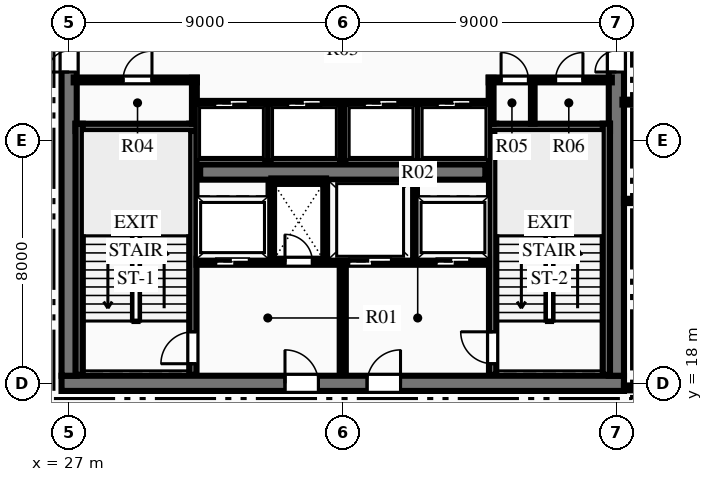
"""IFC4 building model, lengths in metres.
Left out: names, types, materials, properties, quantities, classifications, styles, units other than length and angle.
Written with IfcOpenShell. Run it as: python <this file> out.ifc"""

import sys

from ifc_helpers import new_model, si_unit, direction, frame, frame_2d, origin, place, context, subcontext, project, spatial, rectangle, extrude, element, fill, save


model = new_model("IFC4")
c1 = context("Model", 3, precision=1e-05, world=origin(), true_north=direction((0.0, 1.0)))
c2 = subcontext(c1, "Body", "Model", "MODEL_VIEW")
j1 = project(units=[si_unit("LENGTHUNIT", "METRE"), si_unit("PLANEANGLEUNIT", "RADIAN")], contexts=[c1])
p1 = place(None, origin())
s1 = spatial("IfcSite", under=j1, at=p1, CompositionType="ELEMENT")
p2 = place(p1, origin())
s2 = spatial("IfcBuilding", under=s1, at=p2, CompositionType="ELEMENT")
p3 = place(p2, frame((0.0, 0.0, 220.95)))
s3 = spatial("IfcBuildingStorey", under=s2, at=p3, CompositionType="ELEMENT", Elevation=220.95)
p4 = place(p3, frame((26.75, 18.0, 0.0), z_axis=(0.0, 0.0, 1.0), x_axis=(1.0, 0.0, 0.0)))
e1 = element("IfcWall", 1, at=p4, inside=s3, PredefinedType="SHEAR", context=c2, shape_type="SweptSolid", body=[
    extrude(rectangle(XDim=18.5, YDim=0.5, at=frame_2d((9.25, 0.0))), origin(), (0.0, 0.0, 1.0), 3.75),
])
p5 = place(p4, frame((7.35, 0.0, 0.0)))
e2 = element("IfcOpeningElement", 2, at=p5, cuts=e1, PredefinedType="OPENING", context=c2, shape_type="SweptSolid", body=[
    extrude(rectangle(XDim=1.1, YDim=2.15, at=frame_2d((0.55, 1.075))), frame((0.0, 0.26, 0.0), z_axis=(0.0, -1.0, 0.0), x_axis=(1.0, 0.0, 0.0)), (0.0, 0.0, 1.0), 0.52),
])
p6 = place(p4, frame((10.05, 0.0, 0.0)))
e3 = element("IfcOpeningElement", 3, at=p6, cuts=e1, PredefinedType="OPENING", context=c2, shape_type="SweptSolid", body=[
    extrude(rectangle(XDim=1.1, YDim=2.15, at=frame_2d((0.55, 1.075))), frame((0.0, 0.26, 0.0), z_axis=(0.0, -1.0, 0.0), x_axis=(1.0, 0.0, 0.0)), (0.0, 0.0, 1.0), 0.52),
])
p7 = place(p3, frame((27.0, 18.25, 0.0), z_axis=(0.0, 0.0, 1.0), x_axis=(0.0, 1.0, 0.0)))
e4 = element("IfcWall", 4, at=p7, inside=s3, PredefinedType="SHEAR", context=c2, shape_type="SweptSolid", body=[
    extrude(rectangle(XDim=15.5, YDim=0.5, at=frame_2d((7.75, 0.0))), origin(), (0.0, 0.0, 1.0), 3.75),
])
p8 = place(p7, frame((9.99, 0.0, 0.0)))
e5 = element("IfcOpeningElement", 5, at=p8, cuts=e4, PredefinedType="OPENING", context=c2, shape_type="SweptSolid", body=[
    extrude(rectangle(XDim=1.4, YDim=2.2, at=frame_2d((0.7, 1.1))), frame((0.0, 0.26, 0.0), z_axis=(0.0, -1.0, 0.0), x_axis=(1.0, 0.0, 0.0)), (0.0, 0.0, 1.0), 0.52),
])
p9 = place(p3, frame((45.0, 18.25, 0.0), z_axis=(0.0, 0.0, 1.0), x_axis=(0.0, 1.0, 0.0)))
e6 = element("IfcWall", 6, at=p9, inside=s3, PredefinedType="SHEAR", context=c2, shape_type="SweptSolid", body=[
    extrude(rectangle(XDim=15.5, YDim=0.5, at=frame_2d((7.75, 0.0))), origin(), (0.0, 0.0, 1.0), 3.75),
])
p10 = place(p9, frame((9.99, 0.0, 0.0)))
e7 = element("IfcOpeningElement", 7, at=p10, cuts=e6, PredefinedType="OPENING", context=c2, shape_type="SweptSolid", body=[
    extrude(rectangle(XDim=1.4, YDim=2.2, at=frame_2d((0.7, 1.1))), frame((0.0, 0.26, 0.0), z_axis=(0.0, -1.0, 0.0), x_axis=(1.0, 0.0, 0.0)), (0.0, 0.0, 1.0), 0.52),
])
p11 = place(p3, frame((31.31, 24.95, 0.0), z_axis=(0.0, 0.0, 1.0), x_axis=(1.0, 0.0, 0.0)))
e8 = element("IfcWall", 8, at=p11, inside=s3, PredefinedType="SHEAR", context=c2, shape_type="SweptSolid", body=[
    extrude(rectangle(XDim=9.38, YDim=0.5, at=frame_2d((4.69, 0.0))), origin(), (0.0, 0.0, 1.0), 3.75),
])
p12 = place(p3, frame((31.07, 18.28, 0.0), z_axis=(0.0, 0.0, 1.0), x_axis=(0.0, 1.0, 0.0)))
e9 = element("IfcWall", 9, at=p12, inside=s3, PredefinedType="SHEAR", context=c2, shape_type="SweptSolid", body=[
    extrude(rectangle(XDim=8.26, YDim=0.24, at=frame_2d((4.13, 0.0))), origin(), (0.0, 0.0, 1.0), 3.75),
])
p13 = place(p12, frame((0.365, 0.0, 0.0)))
e10 = element("IfcOpeningElement", 10, at=p13, cuts=e9, PredefinedType="OPENING", context=c2, shape_type="SweptSolid", body=[
    extrude(rectangle(XDim=1.05, YDim=2.15, at=frame_2d((0.525, 1.075))), frame((0.0, 0.13, 0.0), z_axis=(0.0, -1.0, 0.0), x_axis=(1.0, 0.0, 0.0)), (0.0, 0.0, 1.0), 0.26),
])
p14 = place(p3, frame((27.21, 26.42, 0.0), z_axis=(0.0, 0.0, 1.0), x_axis=(1.0, 0.0, 0.0)))
e11 = element("IfcWall", 11, at=p14, inside=s3, PredefinedType="SHEAR", context=c2, shape_type="SweptSolid", body=[
    extrude(rectangle(XDim=3.98, YDim=0.24, at=frame_2d((1.99, 0.0))), origin(), (0.0, 0.0, 1.0), 3.75),
])
p15 = place(p3, frame((27.33, 18.28, 0.0), z_axis=(0.0, 0.0, 1.0), x_axis=(0.0, 1.0, 0.0)))
e12 = element("IfcWall", 12, at=p15, inside=s3, PredefinedType="SHEAR", context=c2, shape_type="SweptSolid", body=[
    extrude(rectangle(XDim=8.26, YDim=0.24, at=frame_2d((4.13, 0.0))), origin(), (0.0, 0.0, 1.0), 3.75),
])
p16 = place(p3, frame((40.93, 18.28, 0.0), z_axis=(0.0, 0.0, 1.0), x_axis=(0.0, 1.0, 0.0)))
e13 = element("IfcWall", 13, at=p16, inside=s3, PredefinedType="SHEAR", context=c2, shape_type="SweptSolid", body=[
    extrude(rectangle(XDim=8.26, YDim=0.24, at=frame_2d((4.13, 0.0))), origin(), (0.0, 0.0, 1.0), 3.75),
])
p17 = place(p16, frame((0.365, 0.0, 0.0)))
e14 = element("IfcOpeningElement", 14, at=p17, cuts=e13, PredefinedType="OPENING", context=c2, shape_type="SweptSolid", body=[
    extrude(rectangle(XDim=1.05, YDim=2.15, at=frame_2d((0.525, 1.075))), frame((0.0, 0.13, 0.0), z_axis=(0.0, -1.0, 0.0), x_axis=(1.0, 0.0, 0.0)), (0.0, 0.0, 1.0), 0.26),
])
p18 = place(p3, frame((40.81, 26.42, 0.0), z_axis=(0.0, 0.0, 1.0), x_axis=(1.0, 0.0, 0.0)))
e15 = element("IfcWall", 15, at=p18, inside=s3, PredefinedType="SHEAR", context=c2, shape_type="SweptSolid", body=[
    extrude(rectangle(XDim=3.98, YDim=0.24, at=frame_2d((1.99, 0.0))), origin(), (0.0, 0.0, 1.0), 3.75),
])
p19 = place(p3, frame((44.67, 18.28, 0.0), z_axis=(0.0, 0.0, 1.0), x_axis=(0.0, 1.0, 0.0)))
e16 = element("IfcWall", 16, at=p19, inside=s3, PredefinedType="SHEAR", context=c2, shape_type="SweptSolid", body=[
    extrude(rectangle(XDim=8.26, YDim=0.24, at=frame_2d((4.13, 0.0))), origin(), (0.0, 0.0, 1.0), 3.75),
])
p20 = place(p3, frame((36.0, 18.28, 0.0), z_axis=(0.0, 0.0, 1.0), x_axis=(0.0, 1.0, 0.0)))
e17 = element("IfcWall", 17, at=p20, inside=s3, PredefinedType="PARTITIONING", context=c2, shape_type="SweptSolid", body=[
    extrude(rectangle(XDim=3.77, YDim=0.2, at=frame_2d((1.885, 0.0))), origin(), (0.0, 0.0, 1.0), 3.47),
])
p21 = place(p3, frame((31.19, 22.0, 0.0), z_axis=(0.0, 0.0, 1.0), x_axis=(1.0, 0.0, 0.0)))
e18 = element("IfcWall", 18, at=p21, inside=s3, PredefinedType="PARTITIONING", context=c2, shape_type="SweptSolid", body=[
    extrude(rectangle(XDim=4.69, YDim=0.2, at=frame_2d((2.345, 0.0))), origin(), (0.0, 0.0, 1.0), 3.47),
])
p22 = place(p21, frame((2.91, 0.0, 0.0)))
e19 = element("IfcOpeningElement", 19, at=p22, cuts=e18, PredefinedType="OPENING", context=c2, shape_type="SweptSolid", body=[
    extrude(rectangle(XDim=0.9, YDim=2.15, at=frame_2d((0.45, 1.075))), frame((0.0, 0.11, 0.0), z_axis=(0.0, -1.0, 0.0), x_axis=(1.0, 0.0, 0.0)), (0.0, 0.0, 1.0), 0.22),
])
p23 = place(p21, frame((0.635, 0.0, 0.0)))
e20 = element("IfcOpeningElement", 20, at=p23, cuts=e18, PredefinedType="OPENING", context=c2, shape_type="SweptSolid", body=[
    extrude(rectangle(XDim=1.1, YDim=2.15, at=frame_2d((0.55, 1.075))), frame((0.0, 0.11, 0.0), z_axis=(0.0, -1.0, 0.0), x_axis=(1.0, 0.0, 0.0)), (0.0, 0.0, 1.0), 0.22),
])
p24 = place(p3, frame((36.12, 22.0, 0.0), z_axis=(0.0, 0.0, 1.0), x_axis=(1.0, 0.0, 0.0)))
e21 = element("IfcWall", 21, at=p24, inside=s3, PredefinedType="PARTITIONING", context=c2, shape_type="SweptSolid", body=[
    extrude(rectangle(XDim=4.69, YDim=0.2, at=frame_2d((2.345, 0.0))), origin(), (0.0, 0.0, 1.0), 3.47),
])
p25 = place(p24, frame((2.955, 0.0, 0.0)))
e22 = element("IfcOpeningElement", 22, at=p25, cuts=e21, PredefinedType="OPENING", context=c2, shape_type="SweptSolid", body=[
    extrude(rectangle(XDim=1.1, YDim=2.15, at=frame_2d((0.55, 1.075))), frame((0.0, 0.11, 0.0), z_axis=(0.0, -1.0, 0.0), x_axis=(1.0, 0.0, 0.0)), (0.0, 0.0, 1.0), 0.22),
])
p26 = place(p24, frame((0.08, 0.0, 0.0)))
e23 = element("IfcOpeningElement", 23, at=p26, cuts=e21, PredefinedType="OPENING", context=c2, shape_type="SweptSolid", body=[
    extrude(rectangle(XDim=1.4, YDim=2.2, at=frame_2d((0.7, 1.1))), frame((0.0, 0.11, 0.0), z_axis=(0.0, -1.0, 0.0), x_axis=(1.0, 0.0, 0.0)), (0.0, 0.0, 1.0), 0.22),
])
for number, where, z_axis, x_axis in (
    (24, (33.65, 22.05, 0.0), (0.0, 0.0, 1.0), (0.0, 1.0, 0.0)),
    (25, (35.45, 22.05, 0.0), (0.0, 0.0, 1.0), (0.0, 1.0, 0.0)),
):
    element("IfcWall", number, at=place(p3, frame(where, z_axis=z_axis, x_axis=x_axis)), inside=s3, PredefinedType="PARTITIONING", context=c2, shape_type="SweptSolid", body=[
        extrude(rectangle(XDim=2.6, YDim=0.18, at=frame_2d((1.3, 0.0))), origin(), (0.0, 0.0, 1.0), 3.47),
    ])
p27 = place(p3, frame((33.65, 24.65, 0.0), z_axis=(0.0, 0.0, 1.0), x_axis=(1.0, 0.0, 0.0)))
e26 = element("IfcWall", 26, at=p27, inside=s3, PredefinedType="PARTITIONING", context=c2, shape_type="SweptSolid", body=[
    extrude(rectangle(XDim=1.8, YDim=0.18, at=frame_2d((0.9, 0.0))), origin(), (0.0, 0.0, 1.0), 3.47),
])
p28 = place(p3, frame((38.35, 22.05, 0.0), z_axis=(0.0, 0.0, 1.0), x_axis=(0.0, 1.0, 0.0)))
e27 = element("IfcWall", 27, at=p28, inside=s3, PredefinedType="PARTITIONING", context=c2, shape_type="SweptSolid", body=[
    extrude(rectangle(XDim=2.6, YDim=0.18, at=frame_2d((1.3, 0.0))), origin(), (0.0, 0.0, 1.0), 3.47),
])
p29 = place(p3, frame((27.15, 27.98, 0.0), z_axis=(0.0, 0.0, 1.0), x_axis=(1.0, 0.0, 0.0)))
e28 = element("IfcWall", 28, at=p29, inside=s3, PredefinedType="PARTITIONING", context=c2, shape_type="SweptSolid", body=[
    extrude(rectangle(XDim=4.05, YDim=0.16, at=frame_2d((2.025, 0.0))), origin(), (0.0, 0.0, 1.0), 3.47),
])
p30 = place(p29, frame((1.625, 0.0, 0.0)))
e29 = element("IfcOpeningElement", 29, at=p30, cuts=e28, PredefinedType="OPENING", context=c2, shape_type="SweptSolid", body=[
    extrude(rectangle(XDim=0.95, YDim=2.15, at=frame_2d((0.475, 1.075))), frame((0.0, 0.09, 0.0), z_axis=(0.0, -1.0, 0.0), x_axis=(1.0, 0.0, 0.0)), (0.0, 0.0, 1.0), 0.18),
])
p31 = place(p3, frame((31.12, 26.54, 0.0), z_axis=(0.0, 0.0, 1.0), x_axis=(0.0, 1.0, 0.0)))
e30 = element("IfcWall", 30, at=p31, inside=s3, PredefinedType="PARTITIONING", context=c2, shape_type="SweptSolid", body=[
    extrude(rectangle(XDim=1.51, YDim=0.16, at=frame_2d((0.755, 0.0))), origin(), (0.0, 0.0, 1.0), 3.47),
])
p32 = place(p3, frame((40.8, 27.98, 0.0), z_axis=(0.0, 0.0, 1.0), x_axis=(1.0, 0.0, 0.0)))
e31 = element("IfcWall", 31, at=p32, inside=s3, PredefinedType="PARTITIONING", context=c2, shape_type="SweptSolid", body=[
    extrude(rectangle(XDim=4.05, YDim=0.16, at=frame_2d((2.025, 0.0))), origin(), (0.0, 0.0, 1.0), 3.47),
])
p33 = place(p32, frame((0.407, 0.0, 0.0)))
e32 = element("IfcOpeningElement", 32, at=p33, cuts=e31, PredefinedType="OPENING", context=c2, shape_type="SweptSolid", body=[
    extrude(rectangle(XDim=0.9, YDim=2.15, at=frame_2d((0.45, 1.075))), frame((0.0, 0.09, 0.0), z_axis=(0.0, -1.0, 0.0), x_axis=(1.0, 0.0, 0.0)), (0.0, 0.0, 1.0), 0.18),
])
p34 = place(p32, frame((2.2, 0.0, 0.0)))
e33 = element("IfcOpeningElement", 33, at=p34, cuts=e31, PredefinedType="OPENING", context=c2, shape_type="SweptSolid", body=[
    extrude(rectangle(XDim=0.9, YDim=2.15, at=frame_2d((0.45, 1.075))), frame((0.0, 0.09, 0.0), z_axis=(0.0, -1.0, 0.0), x_axis=(1.0, 0.0, 0.0)), (0.0, 0.0, 1.0), 0.18),
])
p35 = place(p3, frame((40.88, 26.54, 0.0), z_axis=(0.0, 0.0, 1.0), x_axis=(0.0, 1.0, 0.0)))
e34 = element("IfcWall", 34, at=p35, inside=s3, PredefinedType="PARTITIONING", context=c2, shape_type="SweptSolid", body=[
    extrude(rectangle(XDim=1.51, YDim=0.16, at=frame_2d((0.755, 0.0))), origin(), (0.0, 0.0, 1.0), 3.47),
])
p36 = place(p3, frame((42.25, 26.54, 0.0), z_axis=(0.0, 0.0, 1.0), x_axis=(0.0, 1.0, 0.0)))
e35 = element("IfcWall", 35, at=p36, inside=s3, PredefinedType="PARTITIONING", context=c2, shape_type="SweptSolid", body=[
    extrude(rectangle(XDim=1.44, YDim=0.12, at=frame_2d((0.72, 0.0))), origin(), (0.0, 0.0, 1.0), 3.47),
])
p37 = place(p3, frame((31.2, 27.2, 0.0), z_axis=(0.0, 0.0, 1.0), x_axis=(1.0, 0.0, 0.0)))
e36 = element("IfcWall", 36, at=p37, inside=s3, PredefinedType="PARTITIONING", context=c2, shape_type="SweptSolid", body=[
    extrude(rectangle(XDim=9.6, YDim=0.18, at=frame_2d((4.8, 0.0))), origin(), (0.0, 0.0, 1.0), 3.47),
])
p38 = place(p37, frame((0.59, 0.0, 0.0)))
e37 = element("IfcOpeningElement", 37, at=p38, cuts=e36, PredefinedType="OPENING", context=c2, shape_type="SweptSolid", body=[
    extrude(rectangle(XDim=1.1, YDim=2.15, at=frame_2d((0.55, 1.075))), frame((0.0, 0.1, 0.0), z_axis=(0.0, -1.0, 0.0), x_axis=(1.0, 0.0, 0.0)), (0.0, 0.0, 1.0), 0.2),
])
p39 = place(p37, frame((2.99, 0.0, 0.0)))
e38 = element("IfcOpeningElement", 38, at=p39, cuts=e36, PredefinedType="OPENING", context=c2, shape_type="SweptSolid", body=[
    extrude(rectangle(XDim=1.1, YDim=2.15, at=frame_2d((0.55, 1.075))), frame((0.0, 0.1, 0.0), z_axis=(0.0, -1.0, 0.0), x_axis=(1.0, 0.0, 0.0)), (0.0, 0.0, 1.0), 0.2),
])
p40 = place(p37, frame((5.51, 0.0, 0.0)))
e39 = element("IfcOpeningElement", 39, at=p40, cuts=e36, PredefinedType="OPENING", context=c2, shape_type="SweptSolid", body=[
    extrude(rectangle(XDim=1.1, YDim=2.15, at=frame_2d((0.55, 1.075))), frame((0.0, 0.1, 0.0), z_axis=(0.0, -1.0, 0.0), x_axis=(1.0, 0.0, 0.0)), (0.0, 0.0, 1.0), 0.2),
])
p41 = place(p37, frame((7.91, 0.0, 0.0)))
e40 = element("IfcOpeningElement", 40, at=p41, cuts=e36, PredefinedType="OPENING", context=c2, shape_type="SweptSolid", body=[
    extrude(rectangle(XDim=1.1, YDim=2.15, at=frame_2d((0.55, 1.075))), frame((0.0, 0.1, 0.0), z_axis=(0.0, -1.0, 0.0), x_axis=(1.0, 0.0, 0.0)), (0.0, 0.0, 1.0), 0.2),
])
for number, where, z_axis, x_axis in (
    (41, (33.54, 25.3, 0.0), (0.0, 0.0, 1.0), (0.0, 1.0, 0.0)),
    (42, (36.0, 25.3, 0.0), (0.0, 0.0, 1.0), (0.0, 1.0, 0.0)),
    (43, (38.46, 25.3, 0.0), (0.0, 0.0, 1.0), (0.0, 1.0, 0.0)),
):
    element("IfcWall", number, at=place(p3, frame(where, z_axis=z_axis, x_axis=x_axis)), inside=s3, PredefinedType="PARTITIONING", context=c2, shape_type="SweptSolid", body=[
        extrude(rectangle(XDim=1.9, YDim=0.18, at=frame_2d((0.95, 0.0))), origin(), (0.0, 0.0, 1.0), 3.47),
    ])
p42 = place(p3, frame((45.25, 17.85, 0.0), z_axis=(0.0, 0.0, 1.0), x_axis=(1.0, 0.0, 0.0)))
e44 = element("IfcWall", 44, at=p42, inside=s3, PredefinedType="PARTITIONING", context=c2, shape_type="SweptSolid", body=[
    extrude(rectangle(XDim=8.55, YDim=0.16, at=frame_2d((4.275, 0.0))), origin(), (0.0, 0.0, 1.0), 3.47),
])
p43 = place(p42, frame((2.211, 0.0, 0.0)))
e45 = element("IfcOpeningElement", 45, at=p43, cuts=e44, PredefinedType="OPENING", context=c2, shape_type="SweptSolid", body=[
    extrude(rectangle(XDim=1.05, YDim=2.15, at=frame_2d((0.525, 1.075))), frame((0.0, 0.09, 0.0), z_axis=(0.0, -1.0, 0.0), x_axis=(1.0, 0.0, 0.0)), (0.0, 0.0, 1.0), 0.18),
])
p44 = place(p3, frame((45.2, 27.25, 0.0), z_axis=(0.0, 0.0, 1.0), x_axis=(1.0, 0.0, 0.0)))
e46 = element("IfcWall", 46, at=p44, inside=s3, PredefinedType="PARTITIONING", context=c2, shape_type="SweptSolid", body=[
    extrude(rectangle(XDim=2.25, YDim=0.16, at=frame_2d((1.125, 0.0))), origin(), (0.0, 0.0, 1.0), 3.47),
])
p45 = place(p3, frame((45.25, 24.0, 0.0), z_axis=(0.0, 0.0, 1.0), x_axis=(1.0, 0.0, 0.0)))
e47 = element("IfcWall", 47, at=p45, inside=s3, PredefinedType="PARTITIONING", context=c2, shape_type="SweptSolid", body=[
    extrude(rectangle(XDim=17.085, YDim=0.14, at=frame_2d((8.542, 0.0))), origin(), (0.0, 0.0, 1.0), 3.47),
])
p46 = place(p30, origin())
e48 = element("IfcDoor", 48, at=p46, inside=s3, OperationType="SINGLE_SWING_RIGHT", PredefinedType="DOOR", context=c2, shape_type="SweptSolid", body=[
    extrude(rectangle(XDim=0.95, YDim=2.15, at=frame_2d((0.475, 1.075))), frame((0.0, 0.025, 0.0), z_axis=(0.0, -1.0, 0.0), x_axis=(1.0, 0.0, 0.0)), (0.0, 0.0, 1.0), 0.05),
])
fill(e29, e48)
p47 = place(p33, origin())
e49 = element("IfcDoor", 49, at=p47, inside=s3, OperationType="SINGLE_SWING_LEFT", PredefinedType="DOOR", context=c2, shape_type="SweptSolid", body=[
    extrude(rectangle(XDim=0.9, YDim=2.15, at=frame_2d((0.45, 1.075))), frame((0.0, 0.025, 0.0), z_axis=(0.0, -1.0, 0.0), x_axis=(1.0, 0.0, 0.0)), (0.0, 0.0, 1.0), 0.05),
])
fill(e32, e49)
p48 = place(p34, origin())
e50 = element("IfcDoor", 50, at=p48, inside=s3, OperationType="SINGLE_SWING_RIGHT", PredefinedType="DOOR", context=c2, shape_type="SweptSolid", body=[
    extrude(rectangle(XDim=0.9, YDim=2.15, at=frame_2d((0.45, 1.075))), frame((0.0, 0.025, 0.0), z_axis=(0.0, -1.0, 0.0), x_axis=(1.0, 0.0, 0.0)), (0.0, 0.0, 1.0), 0.05),
])
fill(e33, e50)
p49 = place(p13, origin())
e51 = element("IfcDoor", 51, at=p49, inside=s3, OperationType="SINGLE_SWING_LEFT", PredefinedType="DOOR", context=c2, shape_type="SweptSolid", body=[
    extrude(rectangle(XDim=1.05, YDim=2.15, at=frame_2d((0.525, 1.075))), frame((0.0, 0.025, 0.0), z_axis=(0.0, -1.0, 0.0), x_axis=(1.0, 0.0, 0.0)), (0.0, 0.0, 1.0), 0.05),
])
fill(e10, e51)
p50 = place(p17, origin())
e52 = element("IfcDoor", 52, at=p50, inside=s3, OperationType="SINGLE_SWING_RIGHT", PredefinedType="DOOR", context=c2, shape_type="SweptSolid", body=[
    extrude(rectangle(XDim=1.05, YDim=2.15, at=frame_2d((0.525, 1.075))), frame((0.0, 0.025, 0.0), z_axis=(0.0, -1.0, 0.0), x_axis=(1.0, 0.0, 0.0)), (0.0, 0.0, 1.0), 0.05),
])
fill(e14, e52)
p51 = place(p5, origin())
e53 = element("IfcDoor", 53, at=p51, inside=s3, OperationType="SINGLE_SWING_LEFT", PredefinedType="DOOR", context=c2, shape_type="SweptSolid", body=[
    extrude(rectangle(XDim=1.1, YDim=2.15, at=frame_2d((0.55, 1.075))), frame((0.0, 0.025, 0.0), z_axis=(0.0, -1.0, 0.0), x_axis=(1.0, 0.0, 0.0)), (0.0, 0.0, 1.0), 0.05),
])
fill(e2, e53)
p52 = place(p6, origin())
e54 = element("IfcDoor", 54, at=p52, inside=s3, OperationType="SINGLE_SWING_RIGHT", PredefinedType="DOOR", context=c2, shape_type="SweptSolid", body=[
    extrude(rectangle(XDim=1.1, YDim=2.15, at=frame_2d((0.55, 1.075))), frame((0.0, 0.025, 0.0), z_axis=(0.0, -1.0, 0.0), x_axis=(1.0, 0.0, 0.0)), (0.0, 0.0, 1.0), 0.05),
])
fill(e3, e54)
p53 = place(p22, origin())
e55 = element("IfcDoor", 55, at=p53, inside=s3, OperationType="SINGLE_SWING_LEFT", PredefinedType="DOOR", context=c2, shape_type="SweptSolid", body=[
    extrude(rectangle(XDim=0.9, YDim=2.15, at=frame_2d((0.45, 1.075))), frame((0.0, 0.025, 0.0), z_axis=(0.0, -1.0, 0.0), x_axis=(1.0, 0.0, 0.0)), (0.0, 0.0, 1.0), 0.05),
])
fill(e19, e55)
p54 = place(p8, origin())
e56 = element("IfcDoor", 56, at=p54, inside=s3, OperationType="DOUBLE_DOOR_SINGLE_SWING", PredefinedType="DOOR", context=c2, shape_type="SweptSolid", body=[
    extrude(rectangle(XDim=1.4, YDim=2.2, at=frame_2d((0.7, 1.1))), frame((0.0, 0.025, 0.0), z_axis=(0.0, -1.0, 0.0), x_axis=(1.0, 0.0, 0.0)), (0.0, 0.0, 1.0), 0.05),
])
fill(e5, e56)
p55 = place(p10, origin())
e57 = element("IfcDoor", 57, at=p55, inside=s3, OperationType="DOUBLE_DOOR_SINGLE_SWING", PredefinedType="DOOR", context=c2, shape_type="SweptSolid", body=[
    extrude(rectangle(XDim=1.4, YDim=2.2, at=frame_2d((0.7, 1.1))), frame((0.0, 0.025, 0.0), z_axis=(0.0, -1.0, 0.0), x_axis=(1.0, 0.0, 0.0)), (0.0, 0.0, 1.0), 0.05),
])
fill(e7, e57)
p56 = place(p38, origin())
e58 = element("IfcDoor", 58, at=p56, inside=s3, OperationType="SLIDING_TO_LEFT", PredefinedType="DOOR", context=c2, shape_type="SweptSolid", body=[
    extrude(rectangle(XDim=1.1, YDim=2.15, at=frame_2d((0.55, 1.075))), frame((0.0, 0.025, 0.0), z_axis=(0.0, -1.0, 0.0), x_axis=(1.0, 0.0, 0.0)), (0.0, 0.0, 1.0), 0.05),
])
fill(e37, e58)
p57 = place(p39, origin())
e59 = element("IfcDoor", 59, at=p57, inside=s3, OperationType="SLIDING_TO_LEFT", PredefinedType="DOOR", context=c2, shape_type="SweptSolid", body=[
    extrude(rectangle(XDim=1.1, YDim=2.15, at=frame_2d((0.55, 1.075))), frame((0.0, 0.025, 0.0), z_axis=(0.0, -1.0, 0.0), x_axis=(1.0, 0.0, 0.0)), (0.0, 0.0, 1.0), 0.05),
])
fill(e38, e59)
p58 = place(p40, origin())
e60 = element("IfcDoor", 60, at=p58, inside=s3, OperationType="SLIDING_TO_LEFT", PredefinedType="DOOR", context=c2, shape_type="SweptSolid", body=[
    extrude(rectangle(XDim=1.1, YDim=2.15, at=frame_2d((0.55, 1.075))), frame((0.0, 0.025, 0.0), z_axis=(0.0, -1.0, 0.0), x_axis=(1.0, 0.0, 0.0)), (0.0, 0.0, 1.0), 0.05),
])
fill(e39, e60)
p59 = place(p41, origin())
e61 = element("IfcDoor", 61, at=p59, inside=s3, OperationType="SLIDING_TO_LEFT", PredefinedType="DOOR", context=c2, shape_type="SweptSolid", body=[
    extrude(rectangle(XDim=1.1, YDim=2.15, at=frame_2d((0.55, 1.075))), frame((0.0, 0.025, 0.0), z_axis=(0.0, -1.0, 0.0), x_axis=(1.0, 0.0, 0.0)), (0.0, 0.0, 1.0), 0.05),
])
fill(e40, e61)
p60 = place(p23, origin())
e62 = element("IfcDoor", 62, at=p60, inside=s3, OperationType="SLIDING_TO_LEFT", PredefinedType="DOOR", context=c2, shape_type="SweptSolid", body=[
    extrude(rectangle(XDim=1.1, YDim=2.15, at=frame_2d((0.55, 1.075))), frame((0.0, 0.025, 0.0), z_axis=(0.0, -1.0, 0.0), x_axis=(1.0, 0.0, 0.0)), (0.0, 0.0, 1.0), 0.05),
])
fill(e20, e62)
p61 = place(p25, origin())
e63 = element("IfcDoor", 63, at=p61, inside=s3, OperationType="SLIDING_TO_LEFT", PredefinedType="DOOR", context=c2, shape_type="SweptSolid", body=[
    extrude(rectangle(XDim=1.1, YDim=2.15, at=frame_2d((0.55, 1.075))), frame((0.0, 0.025, 0.0), z_axis=(0.0, -1.0, 0.0), x_axis=(1.0, 0.0, 0.0)), (0.0, 0.0, 1.0), 0.05),
])
fill(e22, e63)
p62 = place(p26, origin())
e64 = element("IfcDoor", 64, at=p62, inside=s3, OperationType="SLIDING_TO_LEFT", PredefinedType="DOOR", context=c2, shape_type="SweptSolid", body=[
    extrude(rectangle(XDim=1.4, YDim=2.2, at=frame_2d((0.7, 1.1))), frame((0.0, 0.025, 0.0), z_axis=(0.0, -1.0, 0.0), x_axis=(1.0, 0.0, 0.0)), (0.0, 0.0, 1.0), 0.05),
])
fill(e23, e64)
save(model, sys.argv[1])
